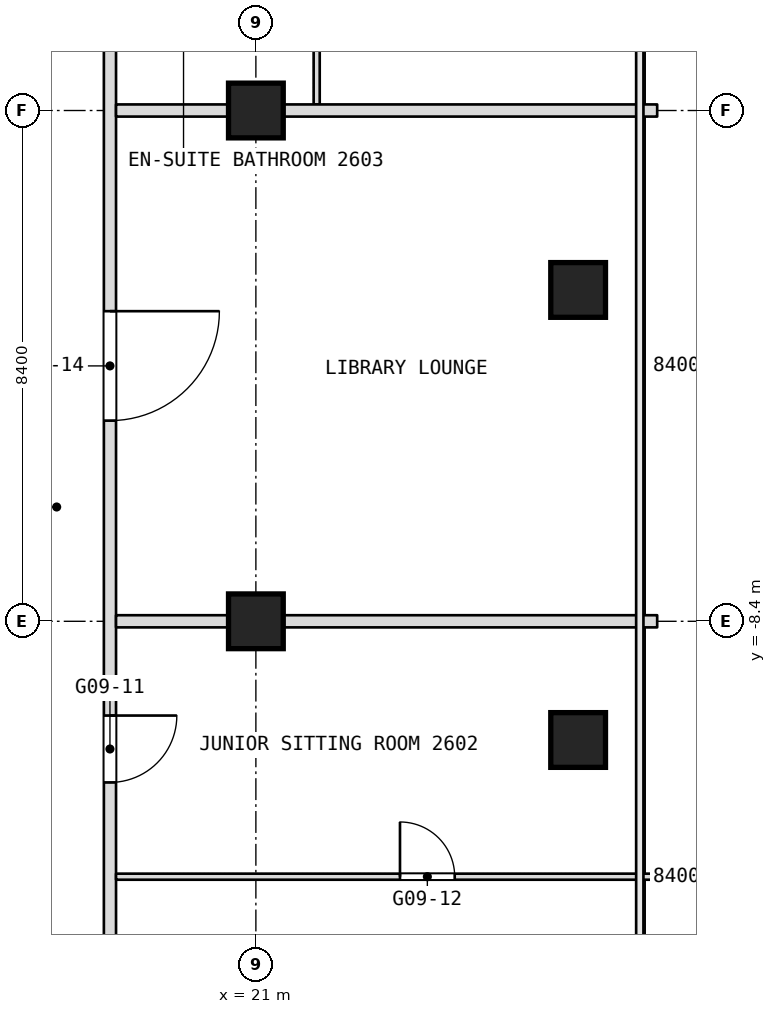
"""IFC4 building model, lengths in metres.
Left out: names, types, materials, properties, quantities, classifications, styles, units other than length and angle.
Written with IfcOpenShell. Run it as: python <this file> out.ifc"""

import sys

from ifc_helpers import new_model, si_unit, direction, frame, frame_2d, origin, origin_2d, place, context, subcontext, project, spatial, rectangle, extrude, element, fill, save


model = new_model("IFC4")
c1 = context("Model", 3, precision=1e-05, world=origin(), true_north=direction((0.0, 1.0)))
c2 = subcontext(c1, "Body", "Model", "MODEL_VIEW")
j1 = project(units=[si_unit("LENGTHUNIT", "METRE"), si_unit("PLANEANGLEUNIT", "RADIAN")], contexts=[c1])
p1 = place(None, origin())
s1 = spatial("IfcSite", under=j1, at=p1, CompositionType="ELEMENT")
p2 = place(p1, origin())
s2 = spatial("IfcBuilding", under=s1, at=p2, CompositionType="ELEMENT")
p3 = place(p2, frame((0.0, 0.0, 119.3)))
s3 = spatial("IfcBuildingStorey", under=s2, at=p3, CompositionType="ELEMENT", Elevation=119.3)
for number, where, z_axis, x_axis in (
    (1, (21.0, -8.4, 0.0), (0.0, 0.0, 1.0), (1.0, 0.0, 0.0)),
    (2, (21.0, 0.0, 0.0), (0.0, 0.0, 1.0), (1.0, 0.0, 0.0)),
    (3, (26.3, -2.951, 0.0), (0.0, 0.0, 1.0), (1.0, 0.0, 0.0)),
    (4, (26.3, -10.352, 0.0), (0.0, 0.0, 1.0), (1.0, 0.0, 0.0)),
):
    element("IfcColumn", number, at=place(p3, frame(where, z_axis=z_axis, x_axis=x_axis)), inside=s3, PredefinedType="COLUMN", context=c2, shape_type="SweptSolid", body=[
        extrude(rectangle(XDim=0.9, YDim=0.9, at=origin_2d()), origin(), (0.0, 0.0, 1.0), 3.6),
    ])
p4 = place(p3, frame((22.0, 0.1, 0.0), z_axis=(0.0, 0.0, 1.0), x_axis=(0.0, 1.0, 0.0)))
e5 = element("IfcWall", 5, at=p4, inside=s3, PredefinedType="PARTITIONING", context=c2, shape_type="SweptSolid", body=[
    extrude(rectangle(XDim=2.35, YDim=0.1, at=frame_2d((1.175, 0.0))), origin(), (0.0, 0.0, 1.0), 3.34),
])
p5 = place(p4, frame((1.3, 0.0, 0.0)))
e6 = element("IfcOpeningElement", 6, at=p5, cuts=e5, PredefinedType="OPENING", context=c2, shape_type="SweptSolid", body=[
    extrude(rectangle(XDim=0.9, YDim=2.1, at=frame_2d((0.45, 1.05))), frame((0.0, 0.05, 0.0), z_axis=(0.0, -1.0, 0.0), x_axis=(1.0, 0.0, 0.0)), (0.0, 0.0, 1.0), 0.1),
])
p6 = place(p3, frame((18.6, -21.708, 0.0), z_axis=(0.0, 0.0, 1.0), x_axis=(0.0, 1.0, 0.0)))
e7 = element("IfcWall", 7, at=p6, inside=s3, PredefinedType="PARTITIONING", context=c2, shape_type="SweptSolid", body=[
    extrude(rectangle(XDim=49.648, YDim=0.2, at=frame_2d((24.824, 0.0))), origin(), (0.0, 0.0, 1.0), 3.34),
])
p7 = place(p6, frame((2.8, 0.0, 0.0)))
e8 = element("IfcOpeningElement", 8, at=p7, cuts=e7, PredefinedType="OPENING", context=c2, shape_type="SweptSolid", body=[
    extrude(rectangle(XDim=1.0, YDim=2.1, at=frame_2d((0.5, 1.05))), frame((0.0, 0.1, 0.0), z_axis=(0.0, -1.0, 0.0), x_axis=(1.0, 0.0, 0.0)), (0.0, 0.0, 1.0), 0.2),
])
p8 = place(p6, frame((10.658, 0.0, 0.0)))
e9 = element("IfcOpeningElement", 9, at=p8, cuts=e7, PredefinedType="OPENING", context=c2, shape_type="SweptSolid", body=[
    extrude(rectangle(XDim=1.1, YDim=2.1, at=frame_2d((0.55, 1.05))), frame((0.0, 0.1, 0.0), z_axis=(0.0, -1.0, 0.0), x_axis=(1.0, 0.0, 0.0)), (0.0, 0.0, 1.0), 0.2),
])
p9 = place(p6, frame((16.608, 0.0, 0.0)))
e10 = element("IfcOpeningElement", 10, at=p9, cuts=e7, PredefinedType="OPENING", context=c2, shape_type="SweptSolid", body=[
    extrude(rectangle(XDim=1.8, YDim=2.1, at=frame_2d((0.9, 1.05))), frame((0.0, 0.1, 0.0), z_axis=(0.0, -1.0, 0.0), x_axis=(1.0, 0.0, 0.0)), (0.0, 0.0, 1.0), 0.2),
])
p10 = place(p6, frame((24.508, 0.0, 0.0)))
e11 = element("IfcOpeningElement", 11, at=p10, cuts=e7, PredefinedType="OPENING", context=c2, shape_type="SweptSolid", body=[
    extrude(rectangle(XDim=1.0, YDim=2.1, at=frame_2d((0.5, 1.05))), frame((0.0, 0.1, 0.0), z_axis=(0.0, -1.0, 0.0), x_axis=(1.0, 0.0, 0.0)), (0.0, 0.0, 1.0), 0.2),
])
p11 = place(p6, frame((26.308, 0.0, 0.0)))
e12 = element("IfcOpeningElement", 12, at=p11, cuts=e7, PredefinedType="OPENING", context=c2, shape_type="SweptSolid", body=[
    extrude(rectangle(XDim=1.0, YDim=2.1, at=frame_2d((0.5, 1.05))), frame((0.0, 0.1, 0.0), z_axis=(0.0, -1.0, 0.0), x_axis=(1.0, 0.0, 0.0)), (0.0, 0.0, 1.0), 0.2),
])
p12 = place(p6, frame((33.708, 0.0, 0.0)))
e13 = element("IfcOpeningElement", 13, at=p12, cuts=e7, PredefinedType="OPENING", context=c2, shape_type="SweptSolid", body=[
    extrude(rectangle(XDim=1.1, YDim=2.1, at=frame_2d((0.55, 1.05))), frame((0.0, 0.1, 0.0), z_axis=(0.0, -1.0, 0.0), x_axis=(1.0, 0.0, 0.0)), (0.0, 0.0, 1.0), 0.2),
])
p13 = place(p6, frame((42.608, 0.0, 0.0)))
e14 = element("IfcOpeningElement", 14, at=p13, cuts=e7, PredefinedType="OPENING", context=c2, shape_type="SweptSolid", body=[
    extrude(rectangle(XDim=1.0, YDim=2.1, at=frame_2d((0.5, 1.05))), frame((0.0, 0.1, 0.0), z_axis=(0.0, -1.0, 0.0), x_axis=(1.0, 0.0, 0.0)), (0.0, 0.0, 1.0), 0.2),
])
p14 = place(p6, frame((44.608, 0.0, 0.0)))
e15 = element("IfcOpeningElement", 15, at=p14, cuts=e7, PredefinedType="OPENING", context=c2, shape_type="SweptSolid", body=[
    extrude(rectangle(XDim=1.0, YDim=2.1, at=frame_2d((0.5, 1.05))), frame((0.0, 0.1, 0.0), z_axis=(0.0, -1.0, 0.0), x_axis=(1.0, 0.0, 0.0)), (0.0, 0.0, 1.0), 0.2),
])
p15 = place(p3, frame((18.7, -12.6, 0.0), z_axis=(0.0, 0.0, 1.0), x_axis=(1.0, 0.0, 0.0)))
e16 = element("IfcWall", 16, at=p15, inside=s3, PredefinedType="PARTITIONING", context=c2, shape_type="SweptSolid", body=[
    extrude(rectangle(XDim=8.9, YDim=0.1, at=frame_2d((4.45, 0.0))), origin(), (0.0, 0.0, 1.0), 3.34),
])
p16 = place(p15, frame((4.67, 0.0, 0.0)))
e17 = element("IfcOpeningElement", 17, at=p16, cuts=e16, PredefinedType="OPENING", context=c2, shape_type="SweptSolid", body=[
    extrude(rectangle(XDim=0.9, YDim=2.1, at=frame_2d((0.45, 1.05))), frame((0.0, 0.05, 0.0), z_axis=(0.0, -1.0, 0.0), x_axis=(1.0, 0.0, 0.0)), (0.0, 0.0, 1.0), 0.1),
])
for number, where, z_axis, x_axis in (
    (18, (18.7, -8.4, 0.0), (0.0, 0.0, 1.0), (1.0, 0.0, 0.0)),
    (19, (18.7, 0.0, 0.0), (0.0, 0.0, 1.0), (1.0, 0.0, 0.0)),
):
    element("IfcWall", number, at=place(p3, frame(where, z_axis=z_axis, x_axis=x_axis)), inside=s3, PredefinedType="PARTITIONING", context=c2, shape_type="SweptSolid", body=[
        extrude(rectangle(XDim=8.9, YDim=0.2, at=frame_2d((4.45, 0.0))), origin(), (0.0, 0.0, 1.0), 2.89),
    ])
p17 = place(p8, origin())
e20 = element("IfcDoor", 20, at=p17, inside=s3, OperationType="SINGLE_SWING_LEFT", PredefinedType="DOOR", context=c2, shape_type="SweptSolid", body=[
    extrude(rectangle(XDim=1.1, YDim=2.1, at=frame_2d((0.55, 1.05))), frame((0.0, 0.025, 0.0), z_axis=(0.0, -1.0, 0.0), x_axis=(1.0, 0.0, 0.0)), (0.0, 0.0, 1.0), 0.05),
])
fill(e9, e20)
p18 = place(p9, origin())
e21 = element("IfcDoor", 21, at=p18, inside=s3, OperationType="DOUBLE_DOOR_SINGLE_SWING", PredefinedType="DOOR", context=c2, shape_type="SweptSolid", body=[
    extrude(rectangle(XDim=1.8, YDim=2.1, at=frame_2d((0.9, 1.05))), frame((0.0, 0.025, 0.0), z_axis=(0.0, -1.0, 0.0), x_axis=(1.0, 0.0, 0.0)), (0.0, 0.0, 1.0), 0.05),
])
fill(e10, e21)
p19 = place(p16, origin())
e22 = element("IfcDoor", 22, at=p19, inside=s3, OperationType="SINGLE_SWING_RIGHT", PredefinedType="DOOR", context=c2, shape_type="SweptSolid", body=[
    extrude(rectangle(XDim=0.9, YDim=2.1, at=frame_2d((0.45, 1.05))), frame((0.0, 0.025, 0.0), z_axis=(0.0, -1.0, 0.0), x_axis=(1.0, 0.0, 0.0)), (0.0, 0.0, 1.0), 0.05),
])
fill(e17, e22)
save(model, sys.argv[1])
